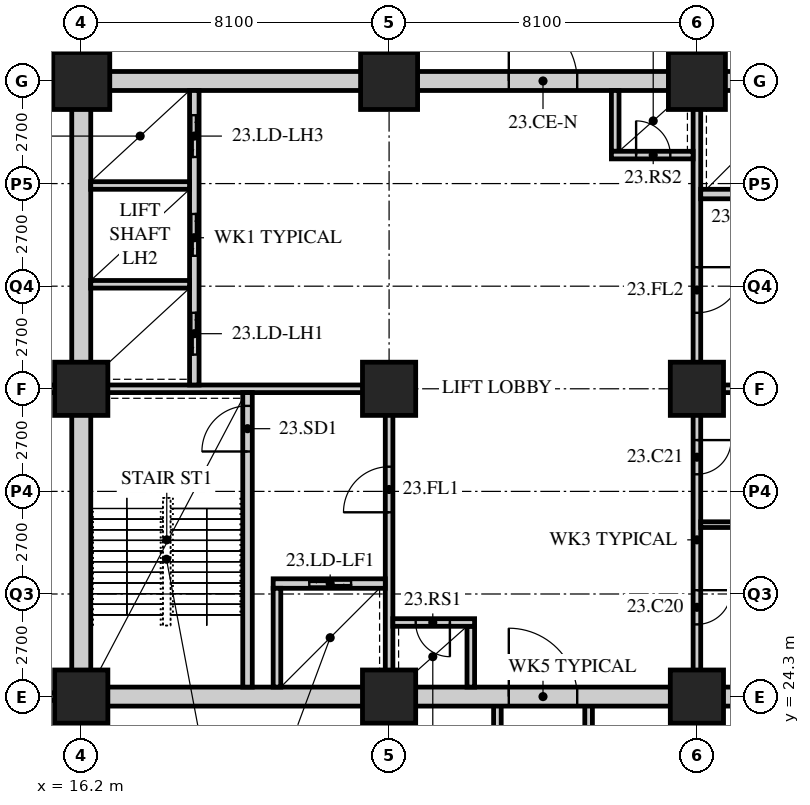
"""IFC4 building model, lengths in metres.
Left out: names, types, materials, properties, quantities, classifications, styles, units other than length and angle.
Written with IfcOpenShell. Run it as: python <this file> out.ifc"""

import sys

from ifc_helpers import new_model, si_unit, direction, frame, frame_2d, origin, origin_2d, place, context, subcontext, project, spatial, rectangle, hollow_rectangle, extrude, element, fill, save


model = new_model("IFC4")
c1 = context("Model", 3, precision=1e-05, world=origin(), true_north=direction((0.0, 1.0)))
c2 = subcontext(c1, "Body", "Model", "MODEL_VIEW")
j1 = project(units=[si_unit("LENGTHUNIT", "METRE"), si_unit("PLANEANGLEUNIT", "RADIAN")], contexts=[c1])
p1 = place(None, origin())
s1 = spatial("IfcSite", under=j1, at=p1, CompositionType="ELEMENT")
p2 = place(p1, origin())
s2 = spatial("IfcBuilding", under=s1, at=p2, CompositionType="ELEMENT")
p3 = place(p2, frame((0.0, 0.0, 90.8)))
s3 = spatial("IfcBuildingStorey", under=s2, at=p3, CompositionType="ELEMENT", Elevation=90.8)
for number, where, z_axis, x_axis in (
    (1, (16.2, 24.3, 0.0), (0.0, 0.0, 1.0), (1.0, 0.0, 0.0)),
    (2, (16.2, 32.4, 0.0), (0.0, 0.0, 1.0), (1.0, 0.0, 0.0)),
):
    element("IfcColumn", number, at=place(p3, frame(where, z_axis=z_axis, x_axis=x_axis)), inside=s3, PredefinedType="COLUMN", context=c2, shape_type="SweptSolid", body=[
        extrude(hollow_rectangle(XDim=1.4, YDim=1.4, WallThickness=0.12, at=origin_2d()), origin(), (0.0, 0.0, 1.0), 7.2),
    ])
p4 = place(p3, frame((16.2, 40.5, 0.0), z_axis=(0.0, 0.0, 1.0), x_axis=(1.0, 0.0, 0.0)))
e3 = element("IfcColumn", 3, at=p4, inside=s3, PredefinedType="COLUMN", context=c2, shape_type="SweptSolid", body=[
    extrude(hollow_rectangle(XDim=1.5, YDim=1.5, WallThickness=0.13, at=origin_2d()), origin(), (0.0, 0.0, 1.0), 7.2),
])
for number, where, z_axis, x_axis in (
    (4, (24.3, 24.3, 0.0), (0.0, 0.0, 1.0), (1.0, 0.0, 0.0)),
    (5, (24.3, 32.4, 0.0), (0.0, 0.0, 1.0), (1.0, 0.0, 0.0)),
):
    element("IfcColumn", number, at=place(p3, frame(where, z_axis=z_axis, x_axis=x_axis)), inside=s3, PredefinedType="COLUMN", context=c2, shape_type="SweptSolid", body=[
        extrude(hollow_rectangle(XDim=1.4, YDim=1.4, WallThickness=0.12, at=origin_2d()), origin(), (0.0, 0.0, 1.0), 7.2),
    ])
p5 = place(p3, frame((24.3, 40.5, 0.0), z_axis=(0.0, 0.0, 1.0), x_axis=(1.0, 0.0, 0.0)))
e6 = element("IfcColumn", 6, at=p5, inside=s3, PredefinedType="COLUMN", context=c2, shape_type="SweptSolid", body=[
    extrude(hollow_rectangle(XDim=1.5, YDim=1.5, WallThickness=0.13, at=origin_2d()), origin(), (0.0, 0.0, 1.0), 7.2),
])
for number, where, z_axis, x_axis in (
    (7, (32.4, 24.3, 0.0), (0.0, 0.0, 1.0), (1.0, 0.0, 0.0)),
    (8, (32.4, 32.4, 0.0), (0.0, 0.0, 1.0), (1.0, 0.0, 0.0)),
):
    element("IfcColumn", number, at=place(p3, frame(where, z_axis=z_axis, x_axis=x_axis)), inside=s3, PredefinedType="COLUMN", context=c2, shape_type="SweptSolid", body=[
        extrude(hollow_rectangle(XDim=1.4, YDim=1.4, WallThickness=0.12, at=origin_2d()), origin(), (0.0, 0.0, 1.0), 7.2),
    ])
p6 = place(p3, frame((32.4, 40.5, 0.0), z_axis=(0.0, 0.0, 1.0), x_axis=(1.0, 0.0, 0.0)))
e9 = element("IfcColumn", 9, at=p6, inside=s3, PredefinedType="COLUMN", context=c2, shape_type="SweptSolid", body=[
    extrude(hollow_rectangle(XDim=1.5, YDim=1.5, WallThickness=0.13, at=origin_2d()), origin(), (0.0, 0.0, 1.0), 7.2),
])
p7 = place(p3, frame((16.0, 40.5, 0.0), z_axis=(0.0, 0.0, 1.0), x_axis=(-1.0, 0.0, 0.0)))
e10 = element("IfcWall", 10, at=p7, inside=s3, PredefinedType="PARTITIONING", context=c2, shape_type="SweptSolid", body=[
    extrude(rectangle(XDim=6.1, YDim=0.15, at=frame_2d((3.05, 0.0))), origin(), (0.0, 0.0, 1.0), 5.85),
])
p8 = place(p3, frame((9.9, 32.4, 0.0), z_axis=(0.0, 0.0, 1.0), x_axis=(1.0, 0.0, 0.0)))
e11 = element("IfcWall", 11, at=p8, inside=s3, PredefinedType="SOLIDWALL", context=c2, shape_type="SweptSolid", body=[
    extrude(rectangle(XDim=6.3, YDim=0.2, at=frame_2d((3.15, 0.0))), origin(), (0.0, 0.0, 1.0), 6.95),
])
p9 = place(p3, frame((16.2, 9.9, 0.0), z_axis=(0.0, 0.0, 1.0), x_axis=(0.0, 1.0, 0.0)))
e12 = element("IfcWall", 12, at=p9, inside=s3, PredefinedType="SOLIDWALL", context=c2, shape_type="SweptSolid", body=[
    extrude(rectangle(XDim=14.4, YDim=0.2, at=frame_2d((7.2, 0.0))), origin(), (0.0, 0.0, 1.0), 5.85),
])
for number, where, z_axis, x_axis in (
    (13, (27.15, 9.9, 0.0), (0.0, 0.0, 1.0), (0.0, 1.0, 0.0)),
    (14, (29.55, 9.9, 0.0), (0.0, 0.0, 1.0), (0.0, 1.0, 0.0)),
):
    element("IfcWall", number, at=place(p3, frame(where, z_axis=z_axis, x_axis=x_axis)), inside=s3, PredefinedType="SOLIDWALL", context=c2, shape_type="SweptSolid", body=[
        extrude(rectangle(XDim=14.4, YDim=0.2, at=frame_2d((7.2, 0.0))), origin(), (0.0, 0.0, 1.0), 6.95),
    ])
p10 = place(p3, frame((9.9, 24.3, 0.0), z_axis=(0.0, 0.0, 1.0), x_axis=(1.0, 0.0, 0.0)))
e15 = element("IfcWall", 15, at=p10, inside=s3, PredefinedType="SOLIDWALL", context=c2, shape_type="SweptSolid", body=[
    extrude(rectangle(XDim=6.3, YDim=0.2, at=frame_2d((3.15, 0.0))), origin(), (0.0, 0.0, 1.0), 5.85),
])
p11 = place(p3, frame((15.95, 24.3, 0.0), z_axis=(0.0, 0.0, 1.0), x_axis=(1.0, 0.0, 0.0)))
e16 = element("IfcWall", 16, at=p11, inside=s3, PredefinedType="SOLIDWALL", context=c2, shape_type="SweptSolid", body=[
    extrude(rectangle(XDim=24.8, YDim=0.5, at=frame_2d((12.4, 0.0))), origin(), (0.0, 0.0, 1.0), 6.188),
])
p12 = place(p11, frame((11.5, 0.0, 0.0)))
e17 = element("IfcOpeningElement", 17, at=p12, cuts=e16, PredefinedType="OPENING", context=c2, shape_type="SweptSolid", body=[
    extrude(rectangle(XDim=1.8, YDim=2.4, at=frame_2d((0.9, 1.2))), frame((0.0, 0.26, 0.0), z_axis=(0.0, -1.0, 0.0), x_axis=(1.0, 0.0, 0.0)), (0.0, 0.0, 1.0), 0.52),
])
p13 = place(p3, frame((15.95, 40.5, 0.0), z_axis=(0.0, 0.0, 1.0), x_axis=(1.0, 0.0, 0.0)))
e18 = element("IfcWall", 18, at=p13, inside=s3, PredefinedType="SOLIDWALL", context=c2, shape_type="SweptSolid", body=[
    extrude(rectangle(XDim=24.8, YDim=0.5, at=frame_2d((12.4, 0.0))), origin(), (0.0, 0.0, 1.0), 6.188),
])
p14 = place(p13, frame((11.5, 0.0, 0.0)))
e19 = element("IfcOpeningElement", 19, at=p14, cuts=e18, PredefinedType="OPENING", context=c2, shape_type="SweptSolid", body=[
    extrude(rectangle(XDim=1.8, YDim=2.4, at=frame_2d((0.9, 1.2))), frame((0.0, 0.26, 0.0), z_axis=(0.0, -1.0, 0.0), x_axis=(1.0, 0.0, 0.0)), (0.0, 0.0, 1.0), 0.52),
])
p15 = place(p3, frame((16.2, 24.55, 0.0), z_axis=(0.0, 0.0, 1.0), x_axis=(0.0, 1.0, 0.0)))
e20 = element("IfcWall", 20, at=p15, inside=s3, PredefinedType="SOLIDWALL", context=c2, shape_type="SweptSolid", body=[
    extrude(rectangle(XDim=15.7, YDim=0.5, at=frame_2d((7.85, 0.0))), origin(), (0.0, 0.0, 1.0), 5.85),
])
p16 = place(p3, frame((16.45, 32.4, 0.0), z_axis=(0.0, 0.0, 1.0), x_axis=(1.0, 0.0, 0.0)))
e21 = element("IfcWall", 21, at=p16, inside=s3, PredefinedType="SOLIDWALL", context=c2, shape_type="SweptSolid", body=[
    extrude(rectangle(XDim=7.95, YDim=0.2, at=frame_2d((3.975, 0.0))), origin(), (0.0, 0.0, 1.0), 6.25),
])
p17 = place(p3, frame((24.3, 24.55, 0.0), z_axis=(0.0, 0.0, 1.0), x_axis=(0.0, 1.0, 0.0)))
e22 = element("IfcWall", 22, at=p17, inside=s3, PredefinedType="SOLIDWALL", context=c2, shape_type="SweptSolid", body=[
    extrude(rectangle(XDim=7.75, YDim=0.2, at=frame_2d((3.875, 0.0))), origin(), (0.0, 0.0, 1.0), 6.25),
])
p18 = place(p17, frame((4.6, 0.0, 0.0)))
e23 = element("IfcOpeningElement", 23, at=p18, cuts=e22, PredefinedType="OPENING", context=c2, shape_type="SweptSolid", body=[
    extrude(rectangle(XDim=1.2, YDim=2.1, at=frame_2d((0.6, 1.05))), frame((0.0, 0.11, 0.0), z_axis=(0.0, -1.0, 0.0), x_axis=(1.0, 0.0, 0.0)), (0.0, 0.0, 1.0), 0.22),
])
p19 = place(p3, frame((20.575, 24.55, 0.0), z_axis=(0.0, 0.0, 1.0), x_axis=(0.0, 1.0, 0.0)))
e24 = element("IfcWall", 24, at=p19, inside=s3, PredefinedType="SOLIDWALL", context=c2, shape_type="SweptSolid", body=[
    extrude(rectangle(XDim=7.75, YDim=0.25, at=frame_2d((3.875, 0.0))), origin(), (0.0, 0.0, 1.0), 6.95),
])
p20 = place(p19, frame((6.2, 0.0, 0.0)))
e25 = element("IfcOpeningElement", 25, at=p20, cuts=e24, PredefinedType="OPENING", context=c2, shape_type="SweptSolid", body=[
    extrude(rectangle(XDim=1.2, YDim=2.1, at=frame_2d((0.6, 1.05))), frame((0.0, 0.135, 0.0), z_axis=(0.0, -1.0, 0.0), x_axis=(1.0, 0.0, 0.0)), (0.0, 0.0, 1.0), 0.27),
])
p21 = place(p3, frame((21.25, 27.275, 0.0), z_axis=(0.0, 0.0, 1.0), x_axis=(1.0, 0.0, 0.0)))
e26 = element("IfcWall", 26, at=p21, inside=s3, PredefinedType="SOLIDWALL", context=c2, shape_type="SweptSolid", body=[
    extrude(rectangle(XDim=2.95, YDim=0.25, at=frame_2d((1.475, 0.0))), origin(), (0.0, 0.0, 1.0), 6.95),
])
p22 = place(p21, frame((0.95, 0.0, 0.0)))
e27 = element("IfcOpeningElement", 27, at=p22, cuts=e26, PredefinedType="OPENING", context=c2, shape_type="SweptSolid", body=[
    extrude(rectangle(XDim=1.1, YDim=2.4, at=frame_2d((0.55, 1.2))), frame((0.0, 0.135, 0.0), z_axis=(0.0, -1.0, 0.0), x_axis=(1.0, 0.0, 0.0)), (0.0, 0.0, 1.0), 0.27),
])
p23 = place(p3, frame((21.35, 24.55, 0.0), z_axis=(0.0, 0.0, 1.0), x_axis=(0.0, 1.0, 0.0)))
e28 = element("IfcWall", 28, at=p23, inside=s3, PredefinedType="SOLIDWALL", context=c2, shape_type="SweptSolid", body=[
    extrude(rectangle(XDim=2.6, YDim=0.2, at=frame_2d((1.3, 0.0))), origin(), (0.0, 0.0, 1.0), 6.95),
])
p24 = place(p3, frame((19.175, 32.5, 0.0), z_axis=(0.0, 0.0, 1.0), x_axis=(0.0, 1.0, 0.0)))
e29 = element("IfcWall", 29, at=p24, inside=s3, PredefinedType="SOLIDWALL", context=c2, shape_type="SweptSolid", body=[
    extrude(rectangle(XDim=7.75, YDim=0.25, at=frame_2d((3.875, 0.0))), origin(), (0.0, 0.0, 1.0), 6.95),
])
p25 = place(p24, frame((0.8, 0.0, 0.0)))
e30 = element("IfcOpeningElement", 30, at=p25, cuts=e29, PredefinedType="OPENING", context=c2, shape_type="SweptSolid", body=[
    extrude(rectangle(XDim=1.1, YDim=2.4, at=frame_2d((0.55, 1.2))), frame((0.0, 0.135, 0.0), z_axis=(0.0, -1.0, 0.0), x_axis=(1.0, 0.0, 0.0)), (0.0, 0.0, 1.0), 0.27),
])
p26 = place(p24, frame((3.4, 0.0, 0.0)))
e31 = element("IfcOpeningElement", 31, at=p26, cuts=e29, PredefinedType="OPENING", context=c2, shape_type="SweptSolid", body=[
    extrude(rectangle(XDim=1.1, YDim=2.4, at=frame_2d((0.55, 1.2))), frame((0.0, 0.135, 0.0), z_axis=(0.0, -1.0, 0.0), x_axis=(1.0, 0.0, 0.0)), (0.0, 0.0, 1.0), 0.27),
])
p27 = place(p24, frame((6.0, 0.0, 0.0)))
e32 = element("IfcOpeningElement", 32, at=p27, cuts=e29, PredefinedType="OPENING", context=c2, shape_type="SweptSolid", body=[
    extrude(rectangle(XDim=1.1, YDim=2.4, at=frame_2d((0.55, 1.2))), frame((0.0, 0.135, 0.0), z_axis=(0.0, -1.0, 0.0), x_axis=(1.0, 0.0, 0.0)), (0.0, 0.0, 1.0), 0.27),
])
for number, where, z_axis, x_axis in (
    (33, (16.45, 35.15, 0.0), (0.0, 0.0, 1.0), (1.0, 0.0, 0.0)),
    (34, (16.45, 37.75, 0.0), (0.0, 0.0, 1.0), (1.0, 0.0, 0.0)),
):
    element("IfcWall", number, at=place(p3, frame(where, z_axis=z_axis, x_axis=x_axis)), inside=s3, PredefinedType="SOLIDWALL", context=c2, shape_type="SweptSolid", body=[
        extrude(rectangle(XDim=2.6, YDim=0.2, at=frame_2d((1.3, 0.0))), origin(), (0.0, 0.0, 1.0), 6.95),
    ])
p28 = place(p3, frame((26.45, 24.55, 0.0), z_axis=(0.0, 0.0, 1.0), x_axis=(0.0, 1.0, 0.0)))
e35 = element("IfcWall", 35, at=p28, inside=s3, PredefinedType="SOLIDWALL", context=c2, shape_type="SweptSolid", body=[
    extrude(rectangle(XDim=1.6, YDim=0.2, at=frame_2d((0.8, 0.0))), origin(), (0.0, 0.0, 1.0), 6.95),
])
p29 = place(p3, frame((24.4, 26.25, 0.0), z_axis=(0.0, 0.0, 1.0), x_axis=(1.0, 0.0, 0.0)))
e36 = element("IfcWall", 36, at=p29, inside=s3, PredefinedType="SOLIDWALL", context=c2, shape_type="SweptSolid", body=[
    extrude(rectangle(XDim=2.15, YDim=0.2, at=frame_2d((1.075, 0.0))), origin(), (0.0, 0.0, 1.0), 6.95),
])
p30 = place(p29, frame((0.6, 0.0, 0.0)))
e37 = element("IfcOpeningElement", 37, at=p30, cuts=e36, PredefinedType="OPENING", context=c2, shape_type="SweptSolid", body=[
    extrude(rectangle(XDim=0.9, YDim=2.1, at=frame_2d((0.45, 1.05))), frame((0.0, 0.11, 0.0), z_axis=(0.0, -1.0, 0.0), x_axis=(1.0, 0.0, 0.0)), (0.0, 0.0, 1.0), 0.22),
])
p31 = place(p3, frame((32.3, 32.4, 0.0), z_axis=(0.0, 0.0, 1.0), x_axis=(1.0, 0.0, 0.0)))
e38 = element("IfcWall", 38, at=p31, inside=s3, PredefinedType="SOLIDWALL", context=c2, shape_type="SweptSolid", body=[
    extrude(rectangle(XDim=7.95, YDim=0.2, at=frame_2d((3.975, 0.0))), origin(), (0.0, 0.0, 1.0), 6.25),
])
p32 = place(p3, frame((32.4, 32.5, 0.0), z_axis=(0.0, 0.0, 1.0), x_axis=(0.0, 1.0, 0.0)))
e39 = element("IfcWall", 39, at=p32, inside=s3, PredefinedType="SOLIDWALL", context=c2, shape_type="SweptSolid", body=[
    extrude(rectangle(XDim=7.75, YDim=0.2, at=frame_2d((3.875, 0.0))), origin(), (0.0, 0.0, 1.0), 6.25),
])
p33 = place(p32, frame((1.9, 0.0, 0.0)))
e40 = element("IfcOpeningElement", 40, at=p33, cuts=e39, PredefinedType="OPENING", context=c2, shape_type="SweptSolid", body=[
    extrude(rectangle(XDim=1.2, YDim=2.1, at=frame_2d((0.6, 1.05))), frame((0.0, 0.11, 0.0), z_axis=(0.0, -1.0, 0.0), x_axis=(1.0, 0.0, 0.0)), (0.0, 0.0, 1.0), 0.22),
])
p34 = place(p3, frame((32.5, 37.525, 0.0), z_axis=(0.0, 0.0, 1.0), x_axis=(1.0, 0.0, 0.0)))
e41 = element("IfcWall", 41, at=p34, inside=s3, PredefinedType="SOLIDWALL", context=c2, shape_type="SweptSolid", body=[
    extrude(rectangle(XDim=2.95, YDim=0.25, at=frame_2d((1.475, 0.0))), origin(), (0.0, 0.0, 1.0), 6.95),
])
p35 = place(p34, frame((0.9, 0.0, 0.0)))
e42 = element("IfcOpeningElement", 42, at=p35, cuts=e41, PredefinedType="OPENING", context=c2, shape_type="SweptSolid", body=[
    extrude(rectangle(XDim=1.1, YDim=2.4, at=frame_2d((0.55, 1.2))), frame((0.0, 0.135, 0.0), z_axis=(0.0, -1.0, 0.0), x_axis=(1.0, 0.0, 0.0)), (0.0, 0.0, 1.0), 0.27),
])
p36 = place(p3, frame((30.25, 38.65, 0.0), z_axis=(0.0, 0.0, 1.0), x_axis=(0.0, 1.0, 0.0)))
e43 = element("IfcWall", 43, at=p36, inside=s3, PredefinedType="SOLIDWALL", context=c2, shape_type="SweptSolid", body=[
    extrude(rectangle(XDim=1.6, YDim=0.2, at=frame_2d((0.8, 0.0))), origin(), (0.0, 0.0, 1.0), 6.95),
])
p37 = place(p3, frame((30.15, 38.55, 0.0), z_axis=(0.0, 0.0, 1.0), x_axis=(1.0, 0.0, 0.0)))
e44 = element("IfcWall", 44, at=p37, inside=s3, PredefinedType="SOLIDWALL", context=c2, shape_type="SweptSolid", body=[
    extrude(rectangle(XDim=2.15, YDim=0.2, at=frame_2d((1.075, 0.0))), origin(), (0.0, 0.0, 1.0), 6.95),
])
p38 = place(p37, frame((0.65, 0.0, 0.0)))
e45 = element("IfcOpeningElement", 45, at=p38, cuts=e44, PredefinedType="OPENING", context=c2, shape_type="SweptSolid", body=[
    extrude(rectangle(XDim=0.9, YDim=2.1, at=frame_2d((0.45, 1.05))), frame((0.0, 0.11, 0.0), z_axis=(0.0, -1.0, 0.0), x_axis=(1.0, 0.0, 0.0)), (0.0, 0.0, 1.0), 0.22),
])
p39 = place(p3, frame((32.4, 24.55, 0.0), z_axis=(0.0, 0.0, 1.0), x_axis=(0.0, 1.0, 0.0)))
e46 = element("IfcWall", 46, at=p39, inside=s3, PredefinedType="PARTITIONING", context=c2, shape_type="SweptSolid", body=[
    extrude(rectangle(XDim=7.75, YDim=0.2, at=frame_2d((3.875, 0.0))), origin(), (0.0, 0.0, 1.0), 6.25),
])
p40 = place(p39, frame((1.65, 0.0, 0.0)))
e47 = element("IfcOpeningElement", 47, at=p40, cuts=e46, PredefinedType="OPENING", context=c2, shape_type="SweptSolid", body=[
    extrude(rectangle(XDim=0.9, YDim=2.1, at=frame_2d((0.45, 1.05))), frame((0.0, 0.11, 0.0), z_axis=(0.0, -1.0, 0.0), x_axis=(1.0, 0.0, 0.0)), (0.0, 0.0, 1.0), 0.22),
])
p41 = place(p39, frame((5.6, 0.0, 0.0)))
e48 = element("IfcOpeningElement", 48, at=p41, cuts=e46, PredefinedType="OPENING", context=c2, shape_type="SweptSolid", body=[
    extrude(rectangle(XDim=0.9, YDim=2.1, at=frame_2d((0.45, 1.05))), frame((0.0, 0.11, 0.0), z_axis=(0.0, -1.0, 0.0), x_axis=(1.0, 0.0, 0.0)), (0.0, 0.0, 1.0), 0.22),
])
p42 = place(p3, frame((32.5, 28.825, 0.0), z_axis=(0.0, 0.0, 1.0), x_axis=(1.0, 0.0, 0.0)))
e49 = element("IfcWall", 49, at=p42, inside=s3, PredefinedType="PARTITIONING", context=c2, shape_type="SweptSolid", body=[
    extrude(rectangle(XDim=4.9, YDim=0.15, at=frame_2d((2.45, 0.0))), origin(), (0.0, 0.0, 1.0), 6.95),
])
p43 = place(p40, origin())
e50 = element("IfcDoor", 50, at=p43, inside=s3, OperationType="SINGLE_SWING_LEFT", PredefinedType="DOOR", context=c2, shape_type="SweptSolid", body=[
    extrude(rectangle(XDim=0.9, YDim=2.1, at=frame_2d((0.45, 1.05))), frame((0.0, 0.025, 0.0), z_axis=(0.0, -1.0, 0.0), x_axis=(1.0, 0.0, 0.0)), (0.0, 0.0, 1.0), 0.05),
])
fill(e47, e50)
p44 = place(p41, origin())
e51 = element("IfcDoor", 51, at=p44, inside=s3, OperationType="SINGLE_SWING_LEFT", PredefinedType="DOOR", context=c2, shape_type="SweptSolid", body=[
    extrude(rectangle(XDim=0.9, YDim=2.1, at=frame_2d((0.45, 1.05))), frame((0.0, 0.025, 0.0), z_axis=(0.0, -1.0, 0.0), x_axis=(1.0, 0.0, 0.0)), (0.0, 0.0, 1.0), 0.05),
])
fill(e48, e51)
p45 = place(p20, origin())
e52 = element("IfcDoor", 52, at=p45, inside=s3, OperationType="SINGLE_SWING_LEFT", PredefinedType="DOOR", context=c2, shape_type="SweptSolid", body=[
    extrude(rectangle(XDim=1.2, YDim=2.1, at=frame_2d((0.6, 1.05))), frame((0.0, 0.025, 0.0), z_axis=(0.0, -1.0, 0.0), x_axis=(1.0, 0.0, 0.0)), (0.0, 0.0, 1.0), 0.05),
])
fill(e25, e52)
p46 = place(p18, origin())
e53 = element("IfcDoor", 53, at=p46, inside=s3, OperationType="SINGLE_SWING_LEFT", PredefinedType="DOOR", context=c2, shape_type="SweptSolid", body=[
    extrude(rectangle(XDim=1.2, YDim=2.1, at=frame_2d((0.6, 1.05))), frame((0.0, 0.025, 0.0), z_axis=(0.0, -1.0, 0.0), x_axis=(1.0, 0.0, 0.0)), (0.0, 0.0, 1.0), 0.05),
])
fill(e23, e53)
p47 = place(p30, origin())
e54 = element("IfcDoor", 54, at=p47, inside=s3, OperationType="SINGLE_SWING_LEFT", PredefinedType="DOOR", context=c2, shape_type="SweptSolid", body=[
    extrude(rectangle(XDim=0.9, YDim=2.1, at=frame_2d((0.45, 1.05))), frame((0.0, 0.025, 0.0), z_axis=(0.0, -1.0, 0.0), x_axis=(1.0, 0.0, 0.0)), (0.0, 0.0, 1.0), 0.05),
])
fill(e37, e54)
p48 = place(p33, origin())
e55 = element("IfcDoor", 55, at=p48, inside=s3, OperationType="SINGLE_SWING_LEFT", PredefinedType="DOOR", context=c2, shape_type="SweptSolid", body=[
    extrude(rectangle(XDim=1.2, YDim=2.1, at=frame_2d((0.6, 1.05))), frame((0.0, 0.025, 0.0), z_axis=(0.0, -1.0, 0.0), x_axis=(1.0, 0.0, 0.0)), (0.0, 0.0, 1.0), 0.05),
])
fill(e40, e55)
p49 = place(p38, origin())
e56 = element("IfcDoor", 56, at=p49, inside=s3, OperationType="SINGLE_SWING_LEFT", PredefinedType="DOOR", context=c2, shape_type="SweptSolid", body=[
    extrude(rectangle(XDim=0.9, YDim=2.1, at=frame_2d((0.45, 1.05))), frame((0.0, 0.025, 0.0), z_axis=(0.0, -1.0, 0.0), x_axis=(1.0, 0.0, 0.0)), (0.0, 0.0, 1.0), 0.05),
])
fill(e45, e56)
p50 = place(p25, origin())
e57 = element("IfcDoor", 57, at=p50, inside=s3, OperationType="DOUBLE_DOOR_SLIDING", PredefinedType="DOOR", context=c2, shape_type="SweptSolid", body=[
    extrude(rectangle(XDim=1.1, YDim=2.4, at=frame_2d((0.55, 1.2))), frame((0.0, 0.025, 0.0), z_axis=(0.0, -1.0, 0.0), x_axis=(1.0, 0.0, 0.0)), (0.0, 0.0, 1.0), 0.05),
])
fill(e30, e57)
p51 = place(p26, origin())
e58 = element("IfcDoor", 58, at=p51, inside=s3, OperationType="DOUBLE_DOOR_SLIDING", PredefinedType="DOOR", context=c2, shape_type="SweptSolid", body=[
    extrude(rectangle(XDim=1.1, YDim=2.4, at=frame_2d((0.55, 1.2))), frame((0.0, 0.025, 0.0), z_axis=(0.0, -1.0, 0.0), x_axis=(1.0, 0.0, 0.0)), (0.0, 0.0, 1.0), 0.05),
])
fill(e31, e58)
p52 = place(p27, origin())
e59 = element("IfcDoor", 59, at=p52, inside=s3, OperationType="DOUBLE_DOOR_SLIDING", PredefinedType="DOOR", context=c2, shape_type="SweptSolid", body=[
    extrude(rectangle(XDim=1.1, YDim=2.4, at=frame_2d((0.55, 1.2))), frame((0.0, 0.025, 0.0), z_axis=(0.0, -1.0, 0.0), x_axis=(1.0, 0.0, 0.0)), (0.0, 0.0, 1.0), 0.05),
])
fill(e32, e59)
p53 = place(p22, origin())
e60 = element("IfcDoor", 60, at=p53, inside=s3, OperationType="DOUBLE_DOOR_SLIDING", PredefinedType="DOOR", context=c2, shape_type="SweptSolid", body=[
    extrude(rectangle(XDim=1.1, YDim=2.4, at=frame_2d((0.55, 1.2))), frame((0.0, 0.025, 0.0), z_axis=(0.0, -1.0, 0.0), x_axis=(1.0, 0.0, 0.0)), (0.0, 0.0, 1.0), 0.05),
])
fill(e27, e60)
p54 = place(p12, origin())
e61 = element("IfcDoor", 61, at=p54, inside=s3, OperationType="DOUBLE_DOOR_SINGLE_SWING", PredefinedType="DOOR", context=c2, shape_type="SweptSolid", body=[
    extrude(rectangle(XDim=1.8, YDim=2.4, at=frame_2d((0.9, 1.2))), frame((0.0, 0.025, 0.0), z_axis=(0.0, -1.0, 0.0), x_axis=(1.0, 0.0, 0.0)), (0.0, 0.0, 1.0), 0.05),
])
fill(e17, e61)
p55 = place(p14, origin())
e62 = element("IfcDoor", 62, at=p55, inside=s3, OperationType="DOUBLE_DOOR_SINGLE_SWING", PredefinedType="DOOR", context=c2, shape_type="SweptSolid", body=[
    extrude(rectangle(XDim=1.8, YDim=2.4, at=frame_2d((0.9, 1.2))), frame((0.0, 0.025, 0.0), z_axis=(0.0, -1.0, 0.0), x_axis=(1.0, 0.0, 0.0)), (0.0, 0.0, 1.0), 0.05),
])
fill(e19, e62)
save(model, sys.argv[1])
